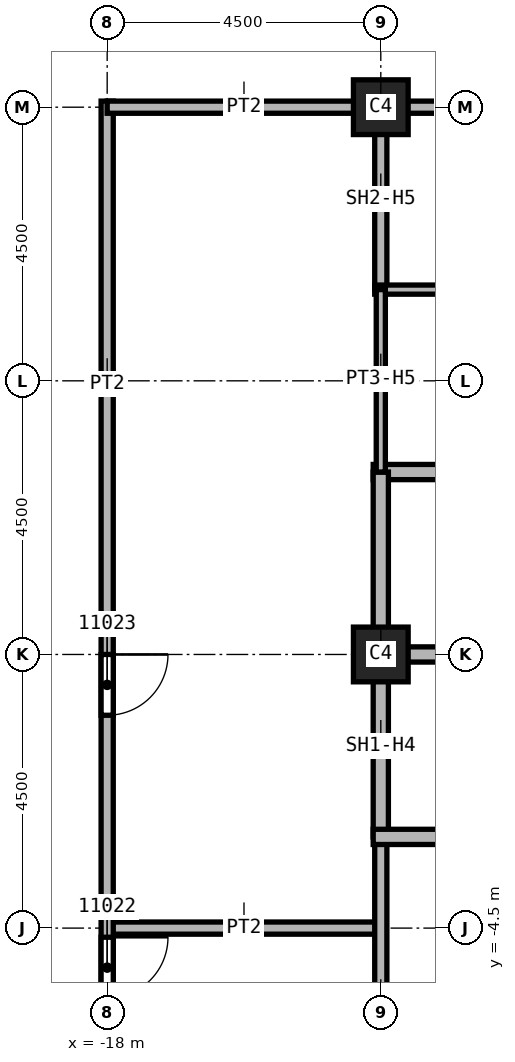
"""IFC4 building model, lengths in metres.
Left out: names, types, materials, properties, quantities, classifications, styles, units other than length and angle.
Written with IfcOpenShell. Run it as: python <this file> out.ifc"""

import sys

from ifc_helpers import new_model, si_unit, direction, frame, frame_2d, origin, origin_2d, place, context, subcontext, project, spatial, rectangle, extrude, element, fill, save


model = new_model("IFC4")
c1 = context("Model", 3, precision=1e-05, world=origin(), true_north=direction((0.0, 1.0)))
c2 = subcontext(c1, "Body", "Model", "MODEL_VIEW")
j1 = project(units=[si_unit("LENGTHUNIT", "METRE"), si_unit("PLANEANGLEUNIT", "RADIAN")], contexts=[c1])
p1 = place(None, origin())
s1 = spatial("IfcSite", under=j1, at=p1, CompositionType="ELEMENT")
p2 = place(p1, origin())
s2 = spatial("IfcBuilding", under=s1, at=p2, CompositionType="ELEMENT")
p3 = place(p2, frame((0.0, 0.0, 184.0)))
s3 = spatial("IfcBuildingStorey", under=s2, at=p3, CompositionType="ELEMENT", Elevation=184.0)
for number, where, z_axis, x_axis in (
    (1, (-13.5, 0.0, 0.0), (0.0, 0.0, 1.0), (1.0, 0.0, 0.0)),
    (2, (-13.5, 9.0, 0.0), (0.0, 0.0, 1.0), (1.0, 0.0, 0.0)),
):
    element("IfcColumn", number, at=place(p3, frame(where, z_axis=z_axis, x_axis=x_axis)), inside=s3, PredefinedType="COLUMN", context=c2, shape_type="SweptSolid", body=[
        extrude(rectangle(XDim=0.9, YDim=0.9, at=origin_2d()), origin(), (0.0, 0.0, 1.0), 3.72),
    ])
p4 = place(p3, frame((-18.0, -4.5, 0.0), z_axis=(0.0, 0.0, 1.0), x_axis=(1.0, 0.0, 0.0)))
e3 = element("IfcWall", 3, at=p4, inside=s3, PredefinedType="PARTITIONING", context=c2, shape_type="SweptSolid", body=[
    extrude(rectangle(XDim=4.5, YDim=0.2, at=frame_2d((2.25, 0.0))), origin(), (0.0, 0.0, 1.0), 3.72),
])
p5 = place(p3, frame((-18.0, 9.1, 0.0), z_axis=(0.0, 0.0, 1.0), x_axis=(0.0, -1.0, 0.0)))
e4 = element("IfcWall", 4, at=p5, inside=s3, PredefinedType="PARTITIONING", context=c2, shape_type="SweptSolid", body=[
    extrude(rectangle(XDim=18.2, YDim=0.2, at=frame_2d((9.1, 0.0))), origin(), (0.0, 0.0, 1.0), 3.72),
])
p6 = place(p5, frame((13.75, 0.0, 0.0)))
e5 = element("IfcOpeningElement", 5, at=p6, cuts=e4, PredefinedType="OPENING", context=c2, shape_type="SweptSolid", body=[
    extrude(rectangle(XDim=1.0, YDim=2.1, at=frame_2d((0.5, 1.05))), frame((0.0, 0.1, 0.0), z_axis=(0.0, -1.0, 0.0), x_axis=(1.0, 0.0, 0.0)), (0.0, 0.0, 1.0), 0.2),
])
p7 = place(p5, frame((9.1, 0.0, 0.0)))
e6 = element("IfcOpeningElement", 6, at=p7, cuts=e4, PredefinedType="OPENING", context=c2, shape_type="SweptSolid", body=[
    extrude(rectangle(XDim=1.0, YDim=2.1, at=frame_2d((0.5, 1.05))), frame((0.0, 0.1, 0.0), z_axis=(0.0, -1.0, 0.0), x_axis=(1.0, 0.0, 0.0)), (0.0, 0.0, 1.0), 0.2),
])
p8 = place(p3, frame((-13.5, 9.0, 0.0), z_axis=(0.0, 0.0, 1.0), x_axis=(-1.0, 0.0, 0.0)))
e7 = element("IfcWall", 7, at=p8, inside=s3, PredefinedType="PARTITIONING", context=c2, shape_type="SweptSolid", body=[
    extrude(rectangle(XDim=4.5, YDim=0.2, at=frame_2d((2.25, 0.0))), origin(), (0.0, 0.0, 1.0), 3.72),
])
p9 = place(p3, frame((-13.6, 9.0, 0.0), z_axis=(0.0, 0.0, 1.0), x_axis=(1.0, 0.0, 0.0)))
e8 = element("IfcWall", 8, at=p9, inside=s3, PredefinedType="SOLIDWALL", context=c2, shape_type="SweptSolid", body=[
    extrude(rectangle(XDim=3.1, YDim=0.2, at=frame_2d((1.55, 0.0))), origin(), (0.0, 0.0, 1.0), 2.958),
])
p10 = place(p3, frame((-13.5, -7.0, 0.0), z_axis=(0.0, 0.0, 1.0), x_axis=(0.0, 1.0, 0.0)))
e9 = element("IfcWall", 9, at=p10, inside=s3, PredefinedType="SOLIDWALL", context=c2, shape_type="SweptSolid", body=[
    extrude(rectangle(XDim=4.0, YDim=0.2, at=frame_2d((2.0, 0.0))), origin(), (0.0, 0.0, 1.0), 2.958),
])
p11 = place(p3, frame((-13.5, 6.0, 0.0), z_axis=(0.0, 0.0, 1.0), x_axis=(0.0, 1.0, 0.0)))
e10 = element("IfcWall", 10, at=p11, inside=s3, PredefinedType="SOLIDWALL", context=c2, shape_type="SweptSolid", body=[
    extrude(rectangle(XDim=3.1, YDim=0.2, at=frame_2d((1.55, 0.0))), origin(), (0.0, 0.0, 1.0), 2.958),
])
p12 = place(p3, frame((-13.625, 0.0, 0.0), z_axis=(0.0, 0.0, 1.0), x_axis=(1.0, 0.0, 0.0)))
e11 = element("IfcWall", 11, at=p12, inside=s3, PredefinedType="SOLIDWALL", context=c2, shape_type="SweptSolid", body=[
    extrude(rectangle(XDim=3.125, YDim=0.25, at=frame_2d((1.562, 0.0))), origin(), (0.0, 0.0, 1.0), 3.72),
])
p13 = place(p3, frame((-13.625, 3.0, 0.0), z_axis=(0.0, 0.0, 1.0), x_axis=(1.0, 0.0, 0.0)))
e12 = element("IfcWall", 12, at=p13, inside=s3, PredefinedType="SOLIDWALL", context=c2, shape_type="SweptSolid", body=[
    extrude(rectangle(XDim=9.25, YDim=0.25, at=frame_2d((4.625, 0.0))), origin(), (0.0, 0.0, 1.0), 3.72),
])
p14 = place(p13, frame((3.25, 0.0, 0.0)))
e13 = element("IfcOpeningElement", 13, at=p14, cuts=e12, PredefinedType="OPENING", context=c2, shape_type="SweptSolid", body=[
    extrude(rectangle(XDim=1.1, YDim=2.1, at=frame_2d((0.55, 1.05))), frame((0.0, 0.125, 0.0), z_axis=(0.0, -1.0, 0.0), x_axis=(1.0, 0.0, 0.0)), (0.0, 0.0, 1.0), 0.25),
])
p15 = place(p3, frame((-13.5, -3.0, 0.0), z_axis=(0.0, 0.0, 1.0), x_axis=(0.0, 1.0, 0.0)))
e14 = element("IfcWall", 14, at=p15, inside=s3, PredefinedType="SOLIDWALL", context=c2, shape_type="SweptSolid", body=[
    extrude(rectangle(XDim=6.0, YDim=0.25, at=frame_2d((3.0, 0.0))), origin(), (0.0, 0.0, 1.0), 2.958),
])
p16 = place(p3, frame((-13.625, -3.0, 0.0), z_axis=(0.0, 0.0, 1.0), x_axis=(1.0, 0.0, 0.0)))
e15 = element("IfcWall", 15, at=p16, inside=s3, PredefinedType="SOLIDWALL", context=c2, shape_type="SweptSolid", body=[
    extrude(rectangle(XDim=6.125, YDim=0.25, at=frame_2d((3.062, 0.0))), origin(), (0.0, 0.0, 1.0), 3.72),
])
p17 = place(p16, frame((3.25, 0.0, 0.0)))
e16 = element("IfcOpeningElement", 16, at=p17, cuts=e15, PredefinedType="OPENING", context=c2, shape_type="SweptSolid", body=[
    extrude(rectangle(XDim=1.1, YDim=2.1, at=frame_2d((0.55, 1.05))), frame((0.0, 0.125, 0.0), z_axis=(0.0, -1.0, 0.0), x_axis=(1.0, 0.0, 0.0)), (0.0, 0.0, 1.0), 0.25),
])
p18 = place(p3, frame((-13.6, 6.0, 0.0), z_axis=(0.0, 0.0, 1.0), x_axis=(1.0, 0.0, 0.0)))
e17 = element("IfcWall", 17, at=p18, inside=s3, PredefinedType="PARTITIONING", context=c2, shape_type="SweptSolid", body=[
    extrude(rectangle(XDim=3.1, YDim=0.15, at=frame_2d((1.55, 0.0))), origin(), (0.0, 0.0, 1.0), 3.72),
])
p19 = place(p3, frame((-13.5, 3.0, 0.0), z_axis=(0.0, 0.0, 1.0), x_axis=(0.0, 1.0, 0.0)))
e18 = element("IfcWall", 18, at=p19, inside=s3, PredefinedType="PARTITIONING", context=c2, shape_type="SweptSolid", body=[
    extrude(rectangle(XDim=3.0, YDim=0.15, at=frame_2d((1.5, 0.0))), origin(), (0.0, 0.0, 1.0), 2.958),
])
p20 = place(p6, origin())
e19 = element("IfcDoor", 19, at=p20, inside=s3, OperationType="SINGLE_SWING_LEFT", PredefinedType="DOOR", context=c2, shape_type="SweptSolid", body=[
    extrude(rectangle(XDim=1.0, YDim=2.1, at=frame_2d((0.5, 1.05))), frame((0.0, 0.025, 0.0), z_axis=(0.0, -1.0, 0.0), x_axis=(1.0, 0.0, 0.0)), (0.0, 0.0, 1.0), 0.05),
])
fill(e5, e19)
p21 = place(p7, origin())
e20 = element("IfcDoor", 20, at=p21, inside=s3, OperationType="SINGLE_SWING_RIGHT", PredefinedType="DOOR", context=c2, shape_type="SweptSolid", body=[
    extrude(rectangle(XDim=1.0, YDim=2.1, at=frame_2d((0.5, 1.05))), frame((0.0, 0.025, 0.0), z_axis=(0.0, -1.0, 0.0), x_axis=(1.0, 0.0, 0.0)), (0.0, 0.0, 1.0), 0.05),
])
fill(e6, e20)
save(model, sys.argv[1])
